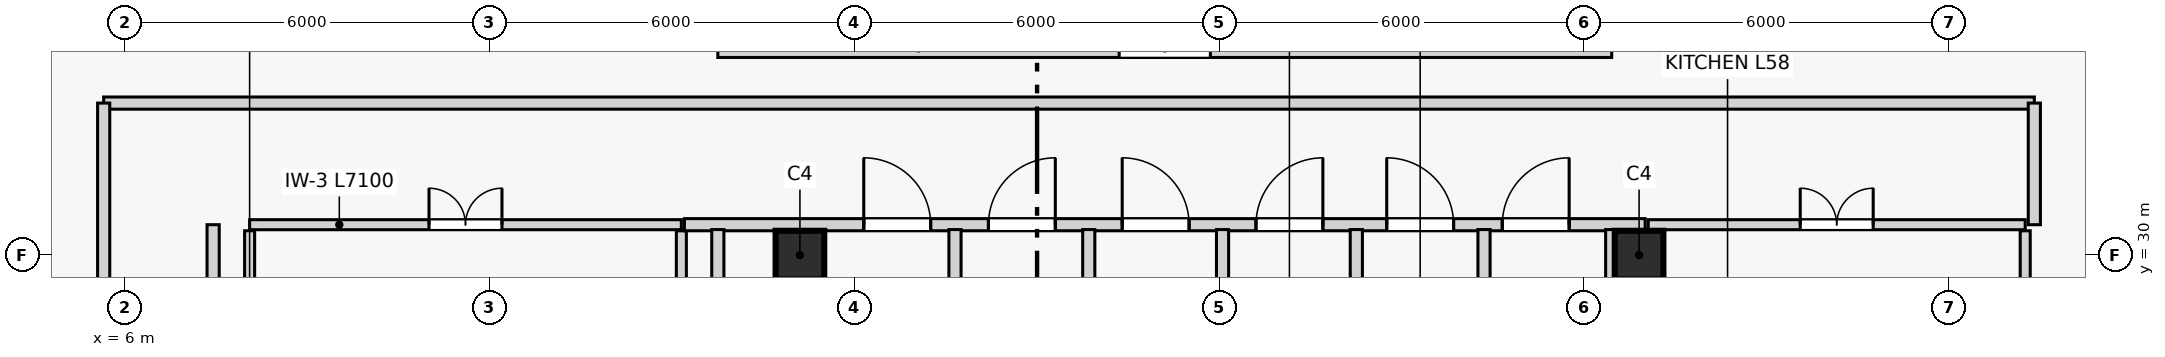
"""IFC4 building model, lengths in metres.
Left out: names, types, materials, properties, quantities, classifications, styles, units other than length and angle.
Written with IfcOpenShell. Run it as: python <this file> out.ifc"""

import sys

from ifc_helpers import new_model, si_unit, direction, frame, frame_2d, origin, origin_2d, place, context, subcontext, project, spatial, rectangle, extrude, source, transform, mapped, element, fill, save


model = new_model("IFC4")
c1 = context("Model", 3, precision=1e-05, world=origin(), true_north=direction((0.0, 1.0)))
c2 = subcontext(c1, "Body", "Model", "MODEL_VIEW")
j1 = project(units=[si_unit("LENGTHUNIT", "METRE"), si_unit("PLANEANGLEUNIT", "RADIAN")], contexts=[c1])
p1 = place(None, origin())
s1 = spatial("IfcSite", under=j1, at=p1, CompositionType="ELEMENT")
p2 = place(p1, origin())
s2 = spatial("IfcBuilding", under=s1, at=p2, CompositionType="ELEMENT")
p3 = place(p2, frame((0.0, 0.0, 220.5)))
s3 = spatial("IfcBuildingStorey", under=s2, at=p3, CompositionType="ELEMENT", Elevation=220.5)
m1 = source(origin(), c2, "Body", "SweptSolid", [
    extrude(rectangle(XDim=0.8, YDim=0.8, at=origin_2d()), origin(), (0.0, 0.0, 1.0), 7.2),
])
for number, where, z_axis, x_axis in (
    (1, (17.1, 30.0, 0.0), (0.0, 0.0, 1.0), (1.0, 0.0, 0.0)),
    (2, (30.9, 30.0, 0.0), (0.0, 0.0, 1.0), (1.0, 0.0, 0.0)),
):
    element("IfcColumn", number, at=place(p3, frame(where, z_axis=z_axis, x_axis=x_axis)), inside=s3, PredefinedType="COLUMN", context=c2, shape_type="MappedRepresentation", body=[
        mapped(m1, transform((0.0, 0.0, 0.0), scale=1.0)),
    ])
p4 = place(p3, frame((15.75, 33.4, 0.0), z_axis=(0.0, 0.0, 1.0), x_axis=(1.0, 0.0, 0.0)))
e3 = element("IfcWall", 3, at=p4, inside=s3, PredefinedType="SOLIDWALL", context=c2, shape_type="SweptSolid", body=[
    extrude(rectangle(XDim=14.7, YDim=0.3, at=frame_2d((7.35, 0.0))), origin(), (0.0, 0.0, 1.0), 6.55),
])
p5 = place(p4, frame((6.6, 0.0, 0.0)))
e4 = element("IfcOpeningElement", 4, at=p5, cuts=e3, PredefinedType="OPENING", context=c2, shape_type="SweptSolid", body=[
    extrude(rectangle(XDim=1.5, YDim=2.3, at=frame_2d((0.75, 1.15))), frame((0.0, 0.16, 0.0), z_axis=(0.0, -1.0, 0.0), x_axis=(1.0, 0.0, 0.0)), (0.0, 0.0, 1.0), 0.32),
])
p6 = place(p3, frame((8.05, 30.5, 0.0), z_axis=(0.0, 0.0, 1.0), x_axis=(1.0, 0.0, 0.0)))
e5 = element("IfcWall", 5, at=p6, inside=s3, PredefinedType="PARTITIONING", context=c2, shape_type="SweptSolid", body=[
    extrude(rectangle(XDim=7.1, YDim=0.165, at=frame_2d((3.55, 0.0))), origin(), (0.0, 0.0, 1.0), 4.95),
])
p7 = place(p6, frame((2.95, 0.0, 0.0)))
e6 = element("IfcOpeningElement", 6, at=p7, cuts=e5, PredefinedType="OPENING", context=c2, shape_type="SweptSolid", body=[
    extrude(rectangle(XDim=1.2, YDim=2.2, at=frame_2d((0.6, 1.1))), frame((0.0, 0.093, 0.0), z_axis=(0.0, -1.0, 0.0), x_axis=(1.0, 0.0, 0.0)), (0.0, 0.0, 1.0), 0.185),
])
for number, where, z_axis, x_axis in (
    (7, (8.05, 27.37, 0.0), (0.0, 0.0, 1.0), (0.0, 1.0, 0.0)),
    (8, (15.15, 27.37, 0.0), (0.0, 0.0, 1.0), (0.0, 1.0, 0.0)),
):
    element("IfcWall", number, at=place(p3, frame(where, z_axis=z_axis, x_axis=x_axis)), inside=s3, PredefinedType="PARTITIONING", context=c2, shape_type="SweptSolid", body=[
        extrude(rectangle(XDim=3.03, YDim=0.165, at=frame_2d((1.515, 0.0))), origin(), (0.0, 0.0, 1.0), 6.55),
    ])
p8 = place(p3, frame((31.05, 30.5, 0.0), z_axis=(0.0, 0.0, 1.0), x_axis=(1.0, 0.0, 0.0)))
e9 = element("IfcWall", 9, at=p8, inside=s3, PredefinedType="PARTITIONING", context=c2, shape_type="SweptSolid", body=[
    extrude(rectangle(XDim=6.2, YDim=0.165, at=frame_2d((3.1, 0.0))), origin(), (0.0, 0.0, 1.0), 4.95),
])
p9 = place(p8, frame((2.5, 0.0, 0.0)))
e10 = element("IfcOpeningElement", 10, at=p9, cuts=e9, PredefinedType="OPENING", context=c2, shape_type="SweptSolid", body=[
    extrude(rectangle(XDim=1.2, YDim=2.2, at=frame_2d((0.6, 1.1))), frame((0.0, 0.093, 0.0), z_axis=(0.0, -1.0, 0.0), x_axis=(1.0, 0.0, 0.0)), (0.0, 0.0, 1.0), 0.185),
])
p10 = place(p3, frame((31.05, 27.37, 0.0), z_axis=(0.0, 0.0, 1.0), x_axis=(0.0, 1.0, 0.0)))
e11 = element("IfcWall", 11, at=p10, inside=s3, PredefinedType="PARTITIONING", context=c2, shape_type="SweptSolid", body=[
    extrude(rectangle(XDim=3.03, YDim=0.165, at=frame_2d((1.515, 0.0))), origin(), (0.0, 0.0, 1.0), 4.95),
])
p11 = place(p3, frame((37.25, 27.37, 0.0), z_axis=(0.0, 0.0, 1.0), x_axis=(0.0, 1.0, 0.0)))
e12 = element("IfcWall", 12, at=p11, inside=s3, PredefinedType="PARTITIONING", context=c2, shape_type="SweptSolid", body=[
    extrude(rectangle(XDim=3.03, YDim=0.165, at=frame_2d((1.515, 0.0))), origin(), (0.0, 0.0, 1.0), 6.55),
])
p12 = place(p3, frame((5.65, 32.5, 0.0), z_axis=(0.0, 0.0, 1.0), x_axis=(1.0, 0.0, 0.0)))
e13 = element("IfcWall", 13, at=p12, inside=s3, PredefinedType="PARTITIONING", context=c2, shape_type="SweptSolid", body=[
    extrude(rectangle(XDim=31.75, YDim=0.2, at=frame_2d((15.875, 0.0))), origin(), (0.0, 0.0, 1.0), 6.55),
])
p13 = place(p3, frame((15.2, 30.5, 0.0), z_axis=(0.0, 0.0, 1.0), x_axis=(1.0, 0.0, 0.0)))
e14 = element("IfcWall", 14, at=p13, inside=s3, PredefinedType="PARTITIONING", context=c2, shape_type="SweptSolid", body=[
    extrude(rectangle(XDim=15.8, YDim=0.2, at=frame_2d((7.9, 0.0))), origin(), (0.0, 0.0, 1.0), 4.95),
])
p14 = place(p13, frame((2.95, 0.0, 0.0)))
e15 = element("IfcOpeningElement", 15, at=p14, cuts=e14, PredefinedType="OPENING", context=c2, shape_type="SweptSolid", body=[
    extrude(rectangle(XDim=1.1, YDim=2.2, at=frame_2d((0.55, 1.1))), frame((0.0, 0.11, 0.0), z_axis=(0.0, -1.0, 0.0), x_axis=(1.0, 0.0, 0.0)), (0.0, 0.0, 1.0), 0.22),
])
p15 = place(p13, frame((5.0, 0.0, 0.0)))
e16 = element("IfcOpeningElement", 16, at=p15, cuts=e14, PredefinedType="OPENING", context=c2, shape_type="SweptSolid", body=[
    extrude(rectangle(XDim=1.1, YDim=2.2, at=frame_2d((0.55, 1.1))), frame((0.0, 0.11, 0.0), z_axis=(0.0, -1.0, 0.0), x_axis=(1.0, 0.0, 0.0)), (0.0, 0.0, 1.0), 0.22),
])
p16 = place(p13, frame((7.2, 0.0, 0.0)))
e17 = element("IfcOpeningElement", 17, at=p16, cuts=e14, PredefinedType="OPENING", context=c2, shape_type="SweptSolid", body=[
    extrude(rectangle(XDim=1.1, YDim=2.2, at=frame_2d((0.55, 1.1))), frame((0.0, 0.11, 0.0), z_axis=(0.0, -1.0, 0.0), x_axis=(1.0, 0.0, 0.0)), (0.0, 0.0, 1.0), 0.22),
])
p17 = place(p13, frame((9.4, 0.0, 0.0)))
e18 = element("IfcOpeningElement", 18, at=p17, cuts=e14, PredefinedType="OPENING", context=c2, shape_type="SweptSolid", body=[
    extrude(rectangle(XDim=1.1, YDim=2.2, at=frame_2d((0.55, 1.1))), frame((0.0, 0.11, 0.0), z_axis=(0.0, -1.0, 0.0), x_axis=(1.0, 0.0, 0.0)), (0.0, 0.0, 1.0), 0.22),
])
p18 = place(p13, frame((11.55, 0.0, 0.0)))
e19 = element("IfcOpeningElement", 19, at=p18, cuts=e14, PredefinedType="OPENING", context=c2, shape_type="SweptSolid", body=[
    extrude(rectangle(XDim=1.1, YDim=2.2, at=frame_2d((0.55, 1.1))), frame((0.0, 0.11, 0.0), z_axis=(0.0, -1.0, 0.0), x_axis=(1.0, 0.0, 0.0)), (0.0, 0.0, 1.0), 0.22),
])
p19 = place(p13, frame((13.45, 0.0, 0.0)))
e20 = element("IfcOpeningElement", 20, at=p19, cuts=e14, PredefinedType="OPENING", context=c2, shape_type="SweptSolid", body=[
    extrude(rectangle(XDim=1.1, YDim=2.2, at=frame_2d((0.55, 1.1))), frame((0.0, 0.11, 0.0), z_axis=(0.0, -1.0, 0.0), x_axis=(1.0, 0.0, 0.0)), (0.0, 0.0, 1.0), 0.22),
])
p20 = place(p3, frame((37.4, 30.5, 0.0), z_axis=(0.0, 0.0, 1.0), x_axis=(0.0, 1.0, 0.0)))
e21 = element("IfcWall", 21, at=p20, inside=s3, PredefinedType="PARTITIONING", context=c2, shape_type="SweptSolid", body=[
    extrude(rectangle(XDim=2.0, YDim=0.2, at=frame_2d((1.0, 0.0))), origin(), (0.0, 0.0, 1.0), 6.55),
])
p21 = place(p3, frame((15.75, 25.1, 0.0), z_axis=(0.0, 0.0, 1.0), x_axis=(0.0, 1.0, 0.0)))
e22 = element("IfcWall", 22, at=p21, inside=s3, PredefinedType="PARTITIONING", context=c2, shape_type="SweptSolid", body=[
    extrude(rectangle(XDim=5.32, YDim=0.2, at=frame_2d((2.66, 0.0))), origin(), (0.0, 0.0, 1.0), 6.55),
])
p22 = place(p3, frame((30.45, 25.1, 0.0), z_axis=(0.0, 0.0, 1.0), x_axis=(0.0, 1.0, 0.0)))
e23 = element("IfcWall", 23, at=p22, inside=s3, PredefinedType="PARTITIONING", context=c2, shape_type="SweptSolid", body=[
    extrude(rectangle(XDim=5.32, YDim=0.2, at=frame_2d((2.66, 0.0))), origin(), (0.0, 0.0, 1.0), 4.95),
])
for number, where, z_axis, x_axis in (
    (24, (19.65, 25.18, 0.0), (0.0, 0.0, 1.0), (0.0, 1.0, 0.0)),
    (25, (21.85, 25.18, 0.0), (0.0, 0.0, 1.0), (0.0, 1.0, 0.0)),
    (26, (24.05, 25.18, 0.0), (0.0, 0.0, 1.0), (0.0, 1.0, 0.0)),
    (27, (26.25, 25.18, 0.0), (0.0, 0.0, 1.0), (0.0, 1.0, 0.0)),
    (28, (28.35, 25.18, 0.0), (0.0, 0.0, 1.0), (0.0, 1.0, 0.0)),
):
    element("IfcWall", number, at=place(p3, frame(where, z_axis=z_axis, x_axis=x_axis)), inside=s3, PredefinedType="PARTITIONING", context=c2, shape_type="SweptSolid", body=[
        extrude(rectangle(XDim=5.24, YDim=0.2, at=frame_2d((2.62, 0.0))), origin(), (0.0, 0.0, 1.0), 6.55),
    ])
p23 = place(p3, frame((5.65, 24.42, 0.0), z_axis=(0.0, 0.0, 1.0), x_axis=(0.0, 1.0, 0.0)))
e29 = element("IfcWall", 29, at=p23, inside=s3, PredefinedType="PARTITIONING", context=c2, shape_type="SweptSolid", body=[
    extrude(rectangle(XDim=8.08, YDim=0.2, at=frame_2d((4.04, 0.0))), origin(), (0.0, 0.0, 1.0), 6.55),
])
p24 = place(p3, frame((7.45, 26.8, 0.0), z_axis=(0.0, 0.0, 1.0), x_axis=(0.0, 1.0, 0.0)))
e30 = element("IfcWall", 30, at=p24, inside=s3, PredefinedType="PARTITIONING", context=c2, shape_type="SweptSolid", body=[
    extrude(rectangle(XDim=3.7, YDim=0.2, at=frame_2d((1.85, 0.0))), origin(), (0.0, 0.0, 1.0), 6.55),
])
m2 = source(origin(), c2, "Body", "SweptSolid", [
    extrude(rectangle(XDim=1.2, YDim=2.2, at=frame_2d((0.6, 1.1))), frame((0.0, 0.025, 0.0), z_axis=(0.0, -1.0, 0.0), x_axis=(1.0, 0.0, 0.0)), (0.0, 0.0, 1.0), 0.05),
])
p25 = place(p7, origin())
e31 = element("IfcDoor", 31, at=p25, inside=s3, OperationType="DOUBLE_DOOR_SINGLE_SWING", PredefinedType="DOOR", context=c2, shape_type="MappedRepresentation", body=[
    mapped(m2, transform((0.0, 0.0, 0.0), scale=1.0)),
])
fill(e6, e31)
p26 = place(p9, origin())
e32 = element("IfcDoor", 32, at=p26, inside=s3, OperationType="DOUBLE_DOOR_SINGLE_SWING", PredefinedType="DOOR", context=c2, shape_type="MappedRepresentation", body=[
    mapped(m2, transform((0.0, 0.0, 0.0), scale=1.0)),
])
fill(e10, e32)
m3 = source(origin(), c2, "Body", "SweptSolid", [
    extrude(rectangle(XDim=1.1, YDim=2.2, at=frame_2d((0.55, 1.1))), frame((0.0, 0.025, 0.0), z_axis=(0.0, -1.0, 0.0), x_axis=(1.0, 0.0, 0.0)), (0.0, 0.0, 1.0), 0.05),
])
p27 = place(p14, origin())
e33 = element("IfcDoor", 33, at=p27, inside=s3, OperationType="SINGLE_SWING_LEFT", PredefinedType="DOOR", context=c2, shape_type="MappedRepresentation", body=[
    mapped(m3, transform((0.0, 0.0, 0.0), scale=1.0)),
])
fill(e15, e33)
p28 = place(p15, origin())
e34 = element("IfcDoor", 34, at=p28, inside=s3, OperationType="SINGLE_SWING_RIGHT", PredefinedType="DOOR", context=c2, shape_type="MappedRepresentation", body=[
    mapped(m3, transform((0.0, 0.0, 0.0), scale=1.0)),
])
fill(e16, e34)
p29 = place(p16, origin())
e35 = element("IfcDoor", 35, at=p29, inside=s3, OperationType="SINGLE_SWING_LEFT", PredefinedType="DOOR", context=c2, shape_type="MappedRepresentation", body=[
    mapped(m3, transform((0.0, 0.0, 0.0), scale=1.0)),
])
fill(e17, e35)
p30 = place(p17, origin())
e36 = element("IfcDoor", 36, at=p30, inside=s3, OperationType="SINGLE_SWING_RIGHT", PredefinedType="DOOR", context=c2, shape_type="MappedRepresentation", body=[
    mapped(m3, transform((0.0, 0.0, 0.0), scale=1.0)),
])
fill(e18, e36)
p31 = place(p18, origin())
e37 = element("IfcDoor", 37, at=p31, inside=s3, OperationType="SINGLE_SWING_LEFT", PredefinedType="DOOR", context=c2, shape_type="MappedRepresentation", body=[
    mapped(m3, transform((0.0, 0.0, 0.0), scale=1.0)),
])
fill(e19, e37)
p32 = place(p19, origin())
e38 = element("IfcDoor", 38, at=p32, inside=s3, OperationType="SINGLE_SWING_RIGHT", PredefinedType="DOOR", context=c2, shape_type="MappedRepresentation", body=[
    mapped(m3, transform((0.0, 0.0, 0.0), scale=1.0)),
])
fill(e20, e38)
save(model, sys.argv[1])
